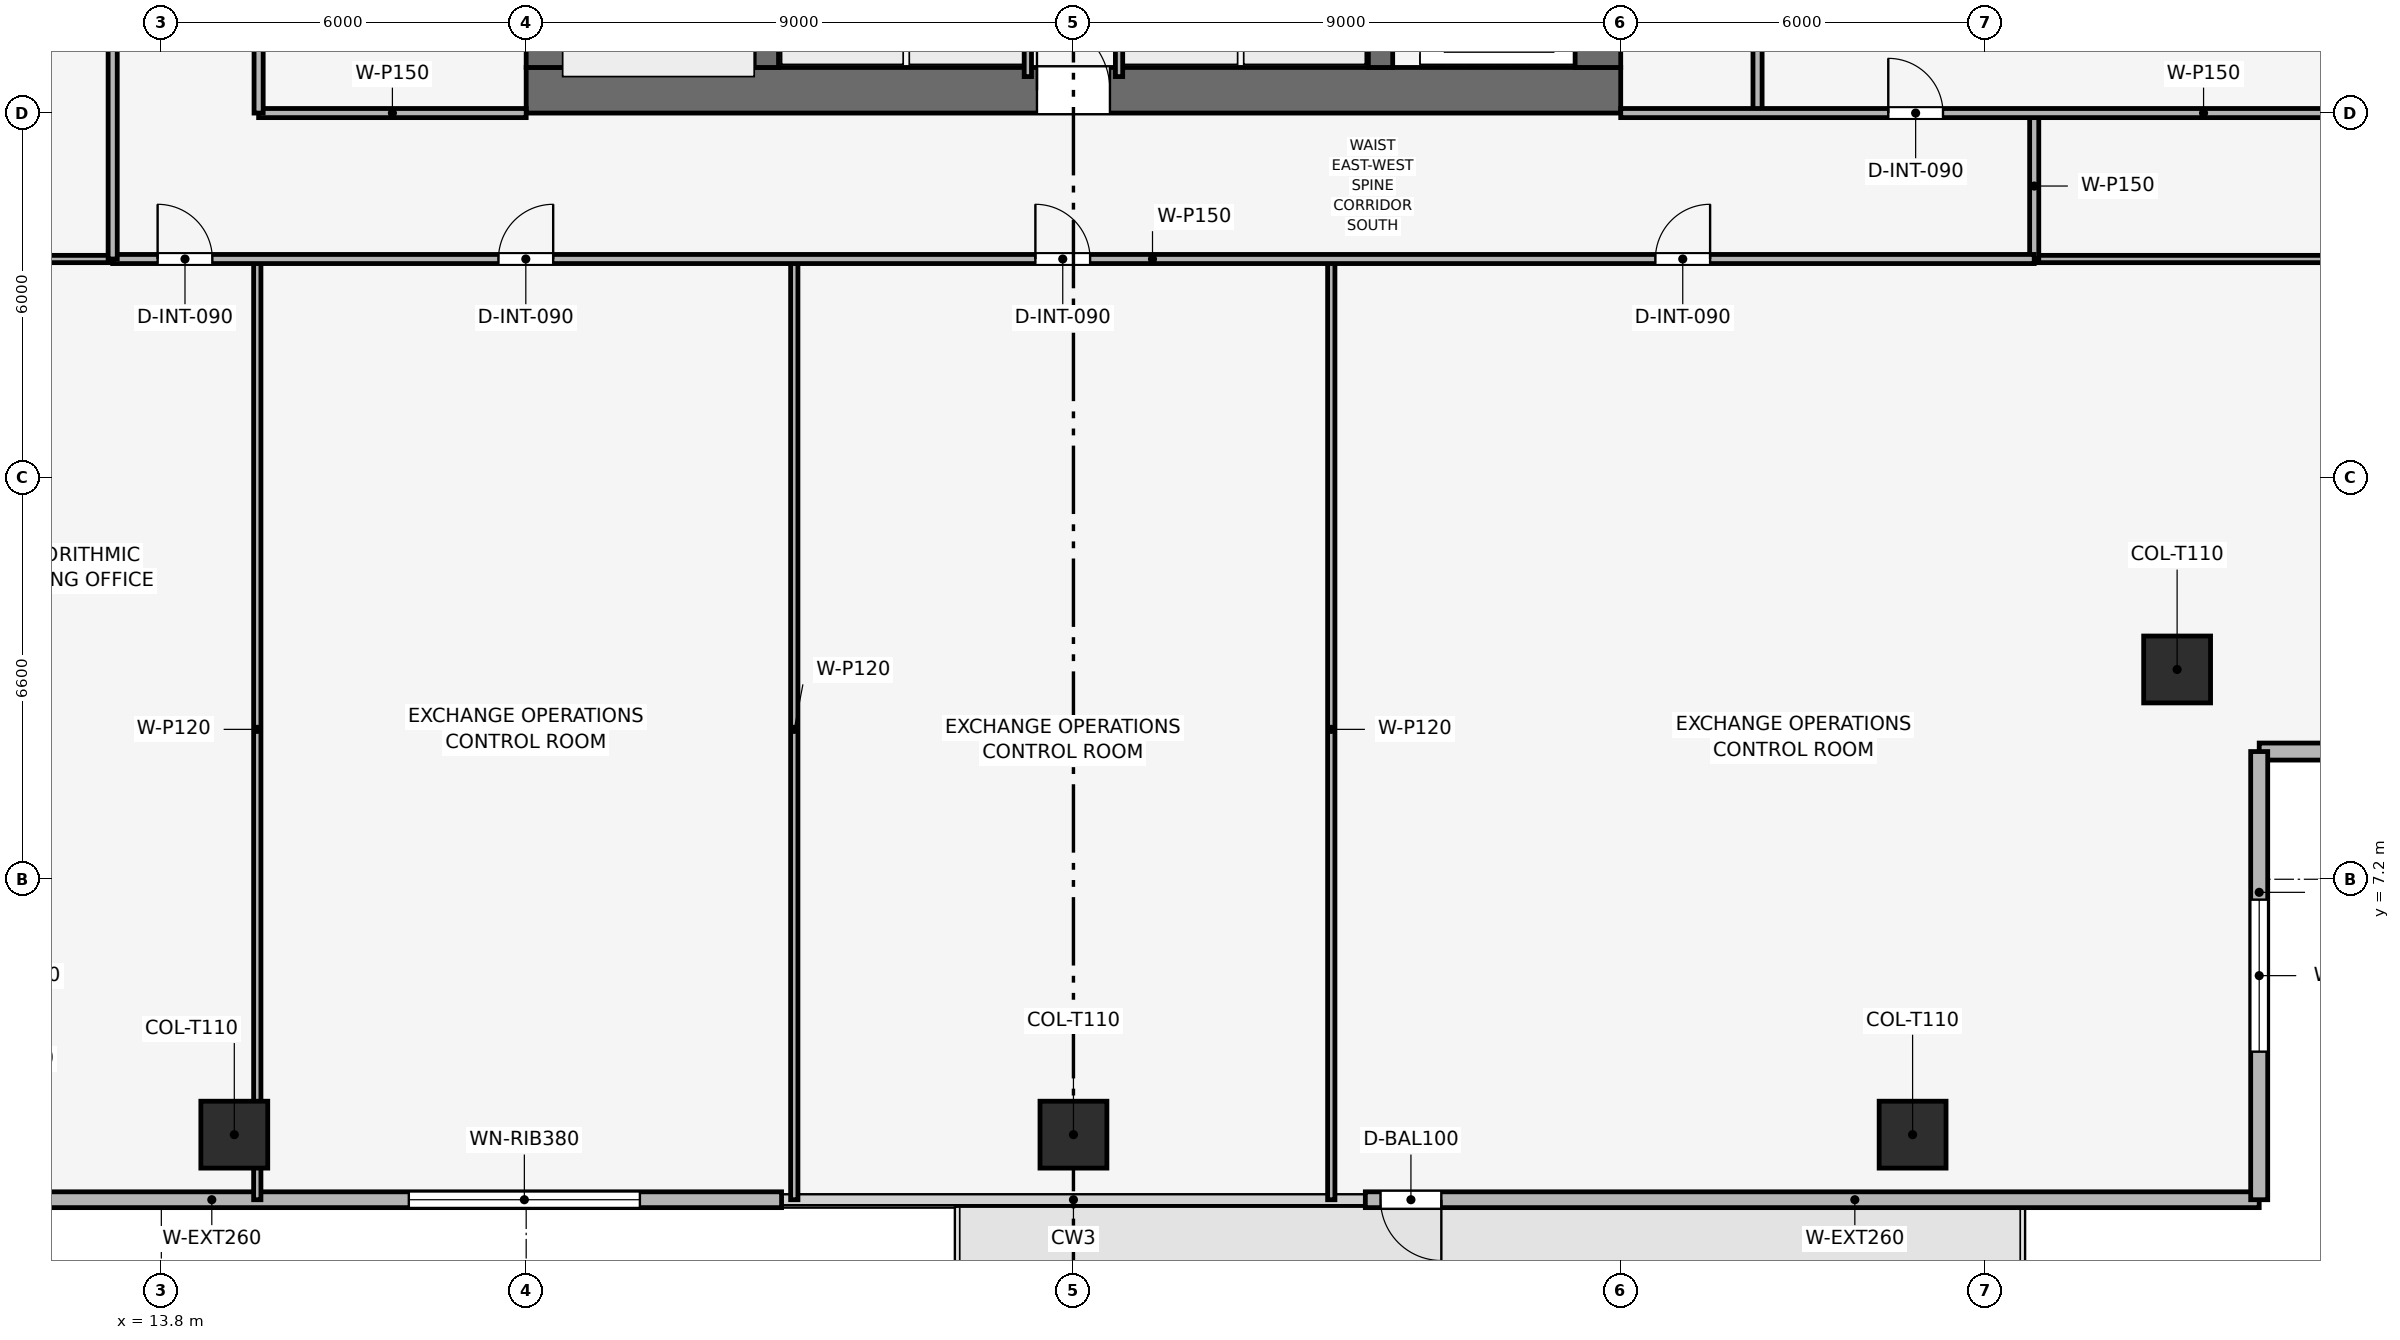
"""IFC4 building model, lengths in metres.
Left out: names, types, materials, properties, quantities, classifications, styles, units other than length and angle.
Written with IfcOpenShell. Run it as: python <this file> out.ifc"""

import sys

from ifc_helpers import new_model, si_unit, direction, frame, frame_2d, origin, origin_2d, place, context, subcontext, project, spatial, rectangle, extrude, element, fill, save


model = new_model("IFC4")
c1 = context("Model", 3, precision=1e-05, world=origin(), true_north=direction((0.0, 1.0)))
c2 = subcontext(c1, "Body", "Model", "MODEL_VIEW")
j1 = project(units=[si_unit("LENGTHUNIT", "METRE"), si_unit("PLANEANGLEUNIT", "RADIAN")], contexts=[c1])
p1 = place(None, origin())
s1 = spatial("IfcSite", under=j1, at=p1, CompositionType="ELEMENT")
p2 = place(p1, origin())
s2 = spatial("IfcBuilding", under=s1, at=p2, CompositionType="ELEMENT")
p3 = place(p2, frame((0.0, 0.0, 233.7)))
s3 = spatial("IfcBuildingStorey", under=s2, at=p3, CompositionType="ELEMENT", Elevation=233.7)
p4 = place(p3, frame((19.8, 20.175, 0.0), z_axis=(0.0, 0.0, 1.0), x_axis=(1.0, 0.0, 0.0)))
e1 = element("IfcWall", 1, at=p4, inside=s3, PredefinedType="SHEAR", context=c2, shape_type="SweptSolid", body=[
    extrude(rectangle(XDim=18.0, YDim=0.75, at=frame_2d((9.0, 0.0))), origin(), (0.0, 0.0, 1.0), 3.75),
])
p5 = place(p4, frame((8.4, 0.0, 0.0)))
e2 = element("IfcOpeningElement", 2, at=p5, cuts=e1, PredefinedType="OPENING", context=c2, shape_type="SweptSolid", body=[
    extrude(rectangle(XDim=1.2, YDim=2.2, at=frame_2d((0.6, 1.1))), frame((0.0, 0.385, 0.0), z_axis=(0.0, -1.0, 0.0), x_axis=(1.0, 0.0, 0.0)), (0.0, 0.0, 1.0), 0.77),
])
p6 = place(p3, frame((20.175, 20.55, 0.0), z_axis=(0.0, 0.0, 1.0), x_axis=(0.0, 1.0, 0.0)))
e3 = element("IfcWall", 3, at=p6, inside=s3, PredefinedType="SHEAR", context=c2, shape_type="SweptSolid", body=[
    extrude(rectangle(XDim=16.5, YDim=0.75, at=frame_2d((8.25, 0.0))), origin(), (0.0, 0.0, 1.0), 3.75),
])
p7 = place(p6, frame((10.25, 0.0, 0.0)))
e4 = element("IfcOpeningElement", 4, at=p7, cuts=e3, PredefinedType="OPENING", context=c2, shape_type="SweptSolid", body=[
    extrude(rectangle(XDim=1.1, YDim=2.15, at=frame_2d((0.55, 1.075))), frame((0.0, 0.385, 0.0), z_axis=(0.0, -1.0, 0.0), x_axis=(1.0, 0.0, 0.0)), (0.0, 0.0, 1.0), 0.77),
])
p8 = place(p3, frame((37.425, 20.55, 0.0), z_axis=(0.0, 0.0, 1.0), x_axis=(0.0, 1.0, 0.0)))
e5 = element("IfcWall", 5, at=p8, inside=s3, PredefinedType="SHEAR", context=c2, shape_type="SweptSolid", body=[
    extrude(rectangle(XDim=16.5, YDim=0.75, at=frame_2d((8.25, 0.0))), origin(), (0.0, 0.0, 1.0), 3.75),
])
p9 = place(p8, frame((4.75, 0.0, 0.0)))
e6 = element("IfcOpeningElement", 6, at=p9, cuts=e5, PredefinedType="OPENING", context=c2, shape_type="SweptSolid", body=[
    extrude(rectangle(XDim=1.1, YDim=2.15, at=frame_2d((0.55, 1.075))), frame((0.0, 0.385, 0.0), z_axis=(0.0, -1.0, 0.0), x_axis=(1.0, 0.0, 0.0)), (0.0, 0.0, 1.0), 0.77),
])
for number, where, z_axis, x_axis in (
    (7, (23.75, 20.55, 0.0), (0.0, 0.0, 1.0), (0.0, 1.0, 0.0)),
    (8, (33.85, 20.55, 0.0), (0.0, 0.0, 1.0), (0.0, 1.0, 0.0)),
):
    element("IfcWall", number, at=place(p3, frame(where, z_axis=z_axis, x_axis=x_axis)), inside=s3, PredefinedType="SHEAR", context=c2, shape_type="SweptSolid", body=[
        extrude(rectangle(XDim=16.5, YDim=0.4, at=frame_2d((8.25, 0.0))), origin(), (0.0, 0.0, 1.0), 3.75),
    ])
for number, where, z_axis, x_axis in (
    (9, (15.0, 3.0, 0.003), (0.0, 0.0, 1.0), (1.0, 0.0, 0.0)),
    (10, (28.8, 3.0, 0.003), (0.0, 0.0, 1.0), (1.0, 0.0, 0.0)),
    (11, (42.6, 3.0, 0.003), (0.0, 0.0, 1.0), (1.0, 0.0, 0.0)),
    (12, (46.95, 10.65, 0.003), (0.0, 0.0, 1.0), (1.0, 0.0, 0.0)),
):
    element("IfcColumn", number, at=place(p3, frame(where, z_axis=z_axis, x_axis=x_axis)), inside=s3, PredefinedType="COLUMN", context=c2, shape_type="SweptSolid", body=[
        extrude(rectangle(XDim=1.1, YDim=1.1, at=origin_2d()), origin(), (0.0, 0.0, 1.0), 3.494),
    ])
p10 = place(p3, frame((48.3, 1.93, 0.0), z_axis=(0.0, 0.0, 1.0), x_axis=(-1.0, 0.0, 0.0)))
e13 = element("IfcWall", 13, at=p10, inside=s3, PredefinedType="SOLIDWALL", context=c2, shape_type="SweptSolid", body=[
    extrude(rectangle(XDim=14.7, YDim=0.26, at=frame_2d((7.35, 0.0))), origin(), (0.0, 0.0, 1.0), 3.5),
])
p11 = place(p10, frame((13.45, 0.0, 0.0)))
e14 = element("IfcOpeningElement", 14, at=p11, cuts=e13, PredefinedType="OPENING", context=c2, shape_type="SweptSolid", body=[
    extrude(rectangle(XDim=1.0, YDim=2.2, at=frame_2d((0.5, 1.1))), frame((0.0, 0.14, 0.0), z_axis=(0.0, -1.0, 0.0), x_axis=(1.0, 0.0, 0.0)), (0.0, 0.0, 1.0), 0.28),
])
p12 = place(p3, frame((24.0, 1.93, 0.0), z_axis=(0.0, 0.0, 1.0), x_axis=(-1.0, 0.0, 0.0)))
e15 = element("IfcWall", 15, at=p12, inside=s3, PredefinedType="SOLIDWALL", context=c2, shape_type="SweptSolid", body=[
    extrude(rectangle(XDim=14.7, YDim=0.26, at=frame_2d((7.35, 0.0))), origin(), (0.0, 0.0, 1.0), 3.5),
])
p13 = place(p12, frame((2.33, 0.0, 0.9)))
e16 = element("IfcOpeningElement", 16, at=p13, cuts=e15, PredefinedType="OPENING", context=c2, shape_type="SweptSolid", body=[
    extrude(rectangle(XDim=3.8, YDim=1.9, at=frame_2d((1.9, 0.95))), frame((0.0, 0.14, 0.0), z_axis=(0.0, -1.0, 0.0), x_axis=(1.0, 0.0, 0.0)), (0.0, 0.0, 1.0), 0.28),
])
p14 = place(p3, frame((55.67, 9.3, 0.0), z_axis=(0.0, 0.0, 1.0), x_axis=(-1.0, 0.0, 0.0)))
e17 = element("IfcWall", 17, at=p14, inside=s3, PredefinedType="SOLIDWALL", context=c2, shape_type="SweptSolid", body=[
    extrude(rectangle(XDim=7.37, YDim=0.28, at=frame_2d((3.685, 0.0))), origin(), (0.0, 0.0, 1.0), 3.5),
])
p15 = place(p14, frame((2.435, 0.0, 0.9)))
e18 = element("IfcOpeningElement", 18, at=p15, cuts=e17, PredefinedType="OPENING", context=c2, shape_type="SweptSolid", body=[
    extrude(rectangle(XDim=2.5, YDim=1.9, at=frame_2d((1.25, 0.95))), frame((0.0, 0.15, 0.0), z_axis=(0.0, -1.0, 0.0), x_axis=(1.0, 0.0, 0.0)), (0.0, 0.0, 1.0), 0.3),
])
p16 = place(p3, frame((48.3, 9.3, 0.0), z_axis=(0.0, 0.0, 1.0), x_axis=(0.0, -1.0, 0.0)))
e19 = element("IfcWall", 19, at=p16, inside=s3, PredefinedType="SOLIDWALL", context=c2, shape_type="SweptSolid", body=[
    extrude(rectangle(XDim=7.37, YDim=0.28, at=frame_2d((3.685, 0.0))), origin(), (0.0, 0.0, 1.0), 3.5),
])
p17 = place(p16, frame((2.435, 0.0, 0.9)))
e20 = element("IfcOpeningElement", 20, at=p17, cuts=e19, PredefinedType="OPENING", context=c2, shape_type="SweptSolid", body=[
    extrude(rectangle(XDim=2.5, YDim=1.9, at=frame_2d((1.25, 0.95))), frame((0.0, 0.15, 0.0), z_axis=(0.0, -1.0, 0.0), x_axis=(1.0, 0.0, 0.0)), (0.0, 0.0, 1.0), 0.3),
])
for number, where, z_axis, x_axis in (
    (21, (28.05, 20.4, 0.0), (0.0, 0.0, 1.0), (0.0, 1.0, 0.0)),
    (22, (29.55, 20.4, 0.0), (0.0, 0.0, 1.0), (0.0, 1.0, 0.0)),
):
    element("IfcWall", number, at=place(p3, frame(where, z_axis=z_axis, x_axis=x_axis)), inside=s3, PredefinedType="PARTITIONING", context=c2, shape_type="SweptSolid", body=[
        extrude(rectangle(XDim=2.75, YDim=0.12, at=frame_2d((1.375, 0.0))), origin(), (0.0, 0.0, 1.0), 3.5),
    ])
p18 = place(p3, frame((15.4, 19.8, 0.0), z_axis=(0.0, 0.0, 1.0), x_axis=(1.0, 0.0, 0.0)))
e23 = element("IfcWall", 23, at=p18, inside=s3, PredefinedType="PARTITIONING", context=c2, shape_type="SweptSolid", body=[
    extrude(rectangle(XDim=4.4, YDim=0.15, at=frame_2d((2.2, 0.0))), origin(), (0.0, 0.0, 1.0), 3.035),
])
p19 = place(p3, frame((15.4, 19.8, 0.0), z_axis=(0.0, 0.0, 1.0), x_axis=(0.0, 1.0, 0.0)))
e24 = element("IfcWall", 24, at=p19, inside=s3, PredefinedType="PARTITIONING", context=c2, shape_type="SweptSolid", body=[
    extrude(rectangle(XDim=10.35, YDim=0.15, at=frame_2d((5.175, 0.0))), origin(), (0.0, 0.0, 1.0), 3.035),
])
p20 = place(p19, frame((1.2, 0.0, 0.0)))
e25 = element("IfcOpeningElement", 25, at=p20, cuts=e24, PredefinedType="OPENING", context=c2, shape_type="SweptSolid", body=[
    extrude(rectangle(XDim=0.9, YDim=2.1, at=frame_2d((0.45, 1.05))), frame((0.0, 0.085, 0.0), z_axis=(0.0, -1.0, 0.0), x_axis=(1.0, 0.0, 0.0)), (0.0, 0.0, 1.0), 0.17),
])
p21 = place(p19, frame((4.7, 0.0, 0.0)))
e26 = element("IfcOpeningElement", 26, at=p21, cuts=e24, PredefinedType="OPENING", context=c2, shape_type="SweptSolid", body=[
    extrude(rectangle(XDim=0.9, YDim=2.1, at=frame_2d((0.45, 1.05))), frame((0.0, 0.085, 0.0), z_axis=(0.0, -1.0, 0.0), x_axis=(1.0, 0.0, 0.0)), (0.0, 0.0, 1.0), 0.17),
])
p22 = place(p19, frame((8.1, 0.0, 0.0)))
e27 = element("IfcOpeningElement", 27, at=p22, cuts=e24, PredefinedType="OPENING", context=c2, shape_type="SweptSolid", body=[
    extrude(rectangle(XDim=0.95, YDim=2.1, at=frame_2d((0.475, 1.05))), frame((0.0, 0.085, 0.0), z_axis=(0.0, -1.0, 0.0), x_axis=(1.0, 0.0, 0.0)), (0.0, 0.0, 1.0), 0.17),
])
p23 = place(p3, frame((40.05, 19.8, 0.0), z_axis=(0.0, 0.0, 1.0), x_axis=(0.0, 1.0, 0.0)))
e28 = element("IfcWall", 28, at=p23, inside=s3, PredefinedType="PARTITIONING", context=c2, shape_type="SweptSolid", body=[
    extrude(rectangle(XDim=7.05, YDim=0.15, at=frame_2d((3.525, 0.0))), origin(), (0.0, 0.0, 1.0), 3.035),
])
for number, where, z_axis, x_axis in (
    (29, (15.378, 1.93, 0.0), (0.0, 0.0, 1.0), (0.0, 1.0, 0.0)),
    (30, (24.209, 1.93, 0.0), (0.0, 0.0, 1.0), (0.0, 1.0, 0.0)),
    (31, (33.04, 1.93, 0.0), (0.0, 0.0, 1.0), (0.0, 1.0, 0.0)),
):
    element("IfcWall", number, at=place(p3, frame(where, z_axis=z_axis, x_axis=x_axis)), inside=s3, PredefinedType="PARTITIONING", context=c2, shape_type="SweptSolid", body=[
        extrude(rectangle(XDim=15.47, YDim=0.12, at=frame_2d((7.735, 0.0))), origin(), (0.0, 0.0, 1.0), 2.885),
    ])
p24 = place(p3, frame((1.93, 17.4, 0.0), z_axis=(0.0, 0.0, 1.0), x_axis=(1.0, 0.0, 0.0)))
e32 = element("IfcWall", 32, at=p24, inside=s3, PredefinedType="PARTITIONING", context=c2, shape_type="SweptSolid", body=[
    extrude(rectangle(XDim=11.07, YDim=0.12, at=frame_2d((5.535, 0.0))), origin(), (0.0, 0.0, 1.0), 2.885),
])
p25 = place(p3, frame((44.6, 17.4, 0.0), z_axis=(0.0, 0.0, 1.0), x_axis=(1.0, 0.0, 0.0)))
e33 = element("IfcWall", 33, at=p25, inside=s3, PredefinedType="PARTITIONING", context=c2, shape_type="SweptSolid", body=[
    extrude(rectangle(XDim=11.07, YDim=0.12, at=frame_2d((5.535, 0.0))), origin(), (0.0, 0.0, 1.0), 2.885),
])
p26 = place(p3, frame((44.6, 17.4, 0.0), z_axis=(0.0, 0.0, 1.0), x_axis=(0.0, 1.0, 0.0)))
e34 = element("IfcWall", 34, at=p26, inside=s3, PredefinedType="PARTITIONING", context=c2, shape_type="SweptSolid", body=[
    extrude(rectangle(XDim=2.4, YDim=0.15, at=frame_2d((1.2, 0.0))), origin(), (0.0, 0.0, 1.0), 3.5),
])
p27 = place(p3, frame((37.8, 19.8, 0.0), z_axis=(0.0, 0.0, 1.0), x_axis=(1.0, 0.0, 0.0)))
e35 = element("IfcWall", 35, at=p27, inside=s3, PredefinedType="PARTITIONING", context=c2, shape_type="SweptSolid", body=[
    extrude(rectangle(XDim=17.87, YDim=0.15, at=frame_2d((8.935, 0.0))), origin(), (0.0, 0.0, 1.0), 2.885),
])
p28 = place(p27, frame((4.4, 0.0, 0.0)))
e36 = element("IfcOpeningElement", 36, at=p28, cuts=e35, PredefinedType="OPENING", context=c2, shape_type="SweptSolid", body=[
    extrude(rectangle(XDim=0.9, YDim=2.1, at=frame_2d((0.45, 1.05))), frame((0.0, 0.085, 0.0), z_axis=(0.0, -1.0, 0.0), x_axis=(1.0, 0.0, 0.0)), (0.0, 0.0, 1.0), 0.17),
])
p29 = place(p3, frame((13.0, 17.4, 0.0), z_axis=(0.0, 0.0, 1.0), x_axis=(1.0, 0.0, 0.0)))
e37 = element("IfcWall", 37, at=p29, inside=s3, PredefinedType="PARTITIONING", context=c2, shape_type="SweptSolid", body=[
    extrude(rectangle(XDim=31.6, YDim=0.15, at=frame_2d((15.8, 0.0))), origin(), (0.0, 0.0, 1.0), 3.035),
])
p30 = place(p29, frame((0.739, 0.0, 0.0)))
e38 = element("IfcOpeningElement", 38, at=p30, cuts=e37, PredefinedType="OPENING", context=c2, shape_type="SweptSolid", body=[
    extrude(rectangle(XDim=0.9, YDim=2.1, at=frame_2d((0.45, 1.05))), frame((0.0, 0.085, 0.0), z_axis=(0.0, -1.0, 0.0), x_axis=(1.0, 0.0, 0.0)), (0.0, 0.0, 1.0), 0.17),
])
p31 = place(p29, frame((6.344, 0.0, 0.0)))
e39 = element("IfcOpeningElement", 39, at=p31, cuts=e37, PredefinedType="OPENING", context=c2, shape_type="SweptSolid", body=[
    extrude(rectangle(XDim=0.9, YDim=2.1, at=frame_2d((0.45, 1.05))), frame((0.0, 0.085, 0.0), z_axis=(0.0, -1.0, 0.0), x_axis=(1.0, 0.0, 0.0)), (0.0, 0.0, 1.0), 0.17),
])
p32 = place(p29, frame((15.174, 0.0, 0.0)))
e40 = element("IfcOpeningElement", 40, at=p32, cuts=e37, PredefinedType="OPENING", context=c2, shape_type="SweptSolid", body=[
    extrude(rectangle(XDim=0.9, YDim=2.1, at=frame_2d((0.45, 1.05))), frame((0.0, 0.085, 0.0), z_axis=(0.0, -1.0, 0.0), x_axis=(1.0, 0.0, 0.0)), (0.0, 0.0, 1.0), 0.17),
])
p33 = place(p29, frame((25.37, 0.0, 0.0)))
e41 = element("IfcOpeningElement", 41, at=p33, cuts=e37, PredefinedType="OPENING", context=c2, shape_type="SweptSolid", body=[
    extrude(rectangle(XDim=0.9, YDim=2.1, at=frame_2d((0.45, 1.05))), frame((0.0, 0.085, 0.0), z_axis=(0.0, -1.0, 0.0), x_axis=(1.0, 0.0, 0.0)), (0.0, 0.0, 1.0), 0.17),
])
p34 = place(p3, frame((13.0, 17.4, 0.0), z_axis=(0.0, 0.0, 1.0), x_axis=(0.0, 1.0, 0.0)))
e42 = element("IfcWall", 42, at=p34, inside=s3, PredefinedType="PARTITIONING", context=c2, shape_type="SweptSolid", body=[
    extrude(rectangle(XDim=22.8, YDim=0.15, at=frame_2d((11.4, 0.0))), origin(), (0.0, 0.0, 1.0), 3.035),
])
p35 = place(p34, frame((4.641, 0.0, 0.0)))
e43 = element("IfcOpeningElement", 43, at=p35, cuts=e42, PredefinedType="OPENING", context=c2, shape_type="SweptSolid", body=[
    extrude(rectangle(XDim=0.9, YDim=2.1, at=frame_2d((0.45, 1.05))), frame((0.0, 0.085, 0.0), z_axis=(0.0, -1.0, 0.0), x_axis=(1.0, 0.0, 0.0)), (0.0, 0.0, 1.0), 0.17),
])
p36 = place(p34, frame((13.641, 0.0, 0.0)))
e44 = element("IfcOpeningElement", 44, at=p36, cuts=e42, PredefinedType="OPENING", context=c2, shape_type="SweptSolid", body=[
    extrude(rectangle(XDim=0.9, YDim=2.1, at=frame_2d((0.45, 1.05))), frame((0.0, 0.085, 0.0), z_axis=(0.0, -1.0, 0.0), x_axis=(1.0, 0.0, 0.0)), (0.0, 0.0, 1.0), 0.17),
])
p37 = place(p11, origin())
e45 = element("IfcDoor", 45, at=p37, inside=s3, OperationType="SINGLE_SWING_LEFT", PredefinedType="DOOR", context=c2, shape_type="SweptSolid", body=[
    extrude(rectangle(XDim=1.0, YDim=2.2, at=frame_2d((0.5, 1.1))), frame((0.0, 0.025, 0.0), z_axis=(0.0, -1.0, 0.0), x_axis=(1.0, 0.0, 0.0)), (0.0, 0.0, 1.0), 0.05),
])
fill(e14, e45)
p38 = place(p13, origin())
e46 = element("IfcWindow", 46, at=p38, inside=s3, PartitioningType="SINGLE_PANEL", PredefinedType="WINDOW", context=c2, shape_type="SweptSolid", body=[
    extrude(rectangle(XDim=3.8, YDim=1.9, at=frame_2d((1.9, 0.95))), frame((0.0, 0.03, 0.0), z_axis=(0.0, -1.0, 0.0), x_axis=(1.0, 0.0, 0.0)), (0.0, 0.0, 1.0), 0.06),
])
fill(e16, e46)
p39 = place(p17, origin())
e47 = element("IfcWindow", 47, at=p39, inside=s3, PartitioningType="SINGLE_PANEL", PredefinedType="WINDOW", context=c2, shape_type="SweptSolid", body=[
    extrude(rectangle(XDim=2.5, YDim=1.9, at=frame_2d((1.25, 0.95))), frame((0.0, 0.03, 0.0), z_axis=(0.0, -1.0, 0.0), x_axis=(1.0, 0.0, 0.0)), (0.0, 0.0, 1.0), 0.06),
])
fill(e20, e47)
p40 = place(p28, origin())
e48 = element("IfcDoor", 48, at=p40, inside=s3, OperationType="SINGLE_SWING_LEFT", PredefinedType="DOOR", context=c2, shape_type="SweptSolid", body=[
    extrude(rectangle(XDim=0.9, YDim=2.1, at=frame_2d((0.45, 1.05))), frame((0.0, 0.025, 0.0), z_axis=(0.0, -1.0, 0.0), x_axis=(1.0, 0.0, 0.0)), (0.0, 0.0, 1.0), 0.05),
])
fill(e36, e48)
p41 = place(p30, origin())
e49 = element("IfcDoor", 49, at=p41, inside=s3, OperationType="SINGLE_SWING_LEFT", PredefinedType="DOOR", context=c2, shape_type="SweptSolid", body=[
    extrude(rectangle(XDim=0.9, YDim=2.1, at=frame_2d((0.45, 1.05))), frame((0.0, 0.025, 0.0), z_axis=(0.0, -1.0, 0.0), x_axis=(1.0, 0.0, 0.0)), (0.0, 0.0, 1.0), 0.05),
])
fill(e38, e49)
p42 = place(p31, origin())
e50 = element("IfcDoor", 50, at=p42, inside=s3, OperationType="SINGLE_SWING_RIGHT", PredefinedType="DOOR", context=c2, shape_type="SweptSolid", body=[
    extrude(rectangle(XDim=0.9, YDim=2.1, at=frame_2d((0.45, 1.05))), frame((0.0, 0.025, 0.0), z_axis=(0.0, -1.0, 0.0), x_axis=(1.0, 0.0, 0.0)), (0.0, 0.0, 1.0), 0.05),
])
fill(e39, e50)
p43 = place(p32, origin())
e51 = element("IfcDoor", 51, at=p43, inside=s3, OperationType="SINGLE_SWING_LEFT", PredefinedType="DOOR", context=c2, shape_type="SweptSolid", body=[
    extrude(rectangle(XDim=0.9, YDim=2.1, at=frame_2d((0.45, 1.05))), frame((0.0, 0.025, 0.0), z_axis=(0.0, -1.0, 0.0), x_axis=(1.0, 0.0, 0.0)), (0.0, 0.0, 1.0), 0.05),
])
fill(e40, e51)
p44 = place(p33, origin())
e52 = element("IfcDoor", 52, at=p44, inside=s3, OperationType="SINGLE_SWING_RIGHT", PredefinedType="DOOR", context=c2, shape_type="SweptSolid", body=[
    extrude(rectangle(XDim=0.9, YDim=2.1, at=frame_2d((0.45, 1.05))), frame((0.0, 0.025, 0.0), z_axis=(0.0, -1.0, 0.0), x_axis=(1.0, 0.0, 0.0)), (0.0, 0.0, 1.0), 0.05),
])
fill(e41, e52)
p45 = place(p5, origin())
e53 = element("IfcDoor", 53, at=p45, inside=s3, OperationType="SINGLE_SWING_LEFT", PredefinedType="DOOR", context=c2, shape_type="SweptSolid", body=[
    extrude(rectangle(XDim=1.2, YDim=2.2, at=frame_2d((0.6, 1.1))), frame((0.0, 0.025, 0.0), z_axis=(0.0, -1.0, 0.0), x_axis=(1.0, 0.0, 0.0)), (0.0, 0.0, 1.0), 0.05),
])
fill(e2, e53)
save(model, sys.argv[1])
